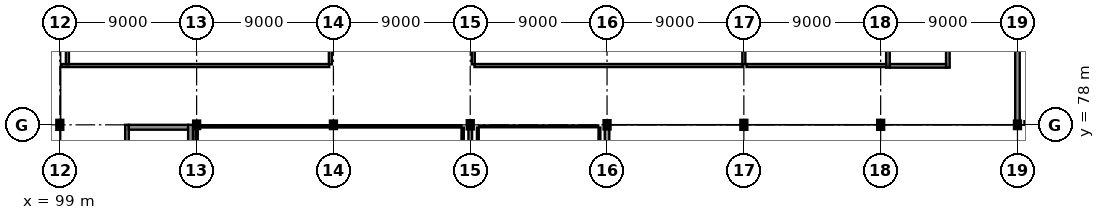
"""IFC4 building model, lengths in metres.
Left out: names, types, materials, properties, quantities, classifications, styles, units other than length and angle.
Written with IfcOpenShell. Run it as: python <this file> out.ifc"""

import sys

from ifc_helpers import new_model, si_unit, direction, frame, frame_2d, origin, origin_2d, place, context, subcontext, project, spatial, rectangle, i_section, extrude, element, fill, save


model = new_model("IFC4")
c1 = context("Model", 3, precision=1e-05, world=origin(), true_north=direction((0.0, 1.0)))
c2 = subcontext(c1, "Body", "Model", "MODEL_VIEW")
j1 = project(units=[si_unit("LENGTHUNIT", "METRE"), si_unit("PLANEANGLEUNIT", "RADIAN")], contexts=[c1])
p1 = place(None, origin())
s1 = spatial("IfcSite", under=j1, at=p1, CompositionType="ELEMENT")
p2 = place(p1, origin())
s2 = spatial("IfcBuilding", under=s1, at=p2, CompositionType="ELEMENT")
p3 = place(p2, frame((0.0, 0.0, 18.9)))
s3 = spatial("IfcBuildingStorey", under=s2, at=p3, CompositionType="ELEMENT", Elevation=18.9)
p4 = place(p3, frame((99.0, 78.0, 0.0), z_axis=(0.0, 0.0, 1.0), x_axis=(1.0, 0.0, 0.0)))
e1 = element("IfcColumn", 1, at=p4, inside=s3, PredefinedType="COLUMN", context=c2, shape_type="SweptSolid", body=[
    extrude(i_section(OverallWidth=0.3, OverallDepth=0.5, WebThickness=0.014, FlangeThickness=0.028, at=origin_2d()), origin(), (0.0, 0.0, 1.0), 4.3),
])
for number, where, z_axis, x_axis in (
    (2, (108.0, 78.0, 0.0), (0.0, 0.0, 1.0), (0.0, 1.0, 0.0)),
    (3, (117.0, 78.0, 0.0), (0.0, 0.0, 1.0), (1.0, 0.0, 0.0)),
):
    element("IfcColumn", number, at=place(p3, frame(where, z_axis=z_axis, x_axis=x_axis)), inside=s3, PredefinedType="COLUMN", context=c2, shape_type="SweptSolid", body=[
        extrude(i_section(OverallWidth=0.3, OverallDepth=0.4, WebThickness=0.013, FlangeThickness=0.024, at=origin_2d()), origin(), (0.0, 0.0, 1.0), 4.3),
    ])
for number, where, z_axis, x_axis in (
    (4, (126.0, 78.0, 0.0), (0.0, 0.0, 1.0), (1.0, 0.0, 0.0)),
    (5, (135.0, 78.0, 0.0), (0.0, 0.0, 1.0), (1.0, 0.0, 0.0)),
):
    element("IfcColumn", number, at=place(p3, frame(where, z_axis=z_axis, x_axis=x_axis)), inside=s3, PredefinedType="COLUMN", context=c2, shape_type="SweptSolid", body=[
        extrude(i_section(OverallWidth=0.3, OverallDepth=0.45, WebThickness=0.014, FlangeThickness=0.026, at=origin_2d()), origin(), (0.0, 0.0, 1.0), 4.3),
    ])
for number, where, z_axis, x_axis in (
    (6, (144.0, 78.0, 0.0), (0.0, 0.0, 1.0), (1.0, 0.0, 0.0)),
    (7, (153.0, 78.0, 0.0), (0.0, 0.0, 1.0), (0.0, 1.0, 0.0)),
):
    element("IfcColumn", number, at=place(p3, frame(where, z_axis=z_axis, x_axis=x_axis)), inside=s3, PredefinedType="COLUMN", context=c2, shape_type="SweptSolid", body=[
        extrude(i_section(OverallWidth=0.3, OverallDepth=0.5, WebThickness=0.014, FlangeThickness=0.028, at=origin_2d()), origin(), (0.0, 0.0, 1.0), 4.5),
    ])
p5 = place(p3, frame((162.0, 78.0, 0.0), z_axis=(0.0, 0.0, 1.0), x_axis=(1.0, 0.0, 0.0)))
e8 = element("IfcColumn", 8, at=p5, inside=s3, PredefinedType="COLUMN", context=c2, shape_type="SweptSolid", body=[
    extrude(i_section(OverallWidth=0.3, OverallDepth=0.4, WebThickness=0.013, FlangeThickness=0.024, at=origin_2d()), origin(), (0.0, 0.0, 1.0), 4.5),
])
p6 = place(p3, frame((135.0, 66.128, 0.0), z_axis=(0.0, 0.0, 1.0), x_axis=(0.0, 1.0, 0.0)))
e9 = element("IfcWall", 9, at=p6, inside=s3, PredefinedType="SOLIDWALL", context=c2, shape_type="SweptSolid", body=[
    extrude(rectangle(XDim=11.649, YDim=0.3, at=frame_2d((5.825, 0.0))), origin(), (0.0, 0.0, 1.0), 3.855),
])
p7 = place(p6, frame((2.262, 0.0, 0.85)))
e10 = element("IfcOpeningElement", 10, at=p7, cuts=e9, PredefinedType="OPENING", context=c2, shape_type="SweptSolid", body=[
    extrude(rectangle(XDim=2.0, YDim=2.0, at=frame_2d((1.0, 1.0))), frame((0.0, 0.165, 0.0), z_axis=(0.0, -1.0, 0.0), x_axis=(1.0, 0.0, 0.0)), (0.0, 0.0, 1.0), 0.33),
])
p8 = place(p6, frame((7.387, 0.0, 0.85)))
e11 = element("IfcOpeningElement", 11, at=p8, cuts=e9, PredefinedType="OPENING", context=c2, shape_type="SweptSolid", body=[
    extrude(rectangle(XDim=2.0, YDim=2.0, at=frame_2d((1.0, 1.0))), frame((0.0, 0.165, 0.0), z_axis=(0.0, -1.0, 0.0), x_axis=(1.0, 0.0, 0.0)), (0.0, 0.0, 1.0), 0.33),
])
p9 = place(p3, frame((162.0, 78.198, 0.0), z_axis=(0.0, 0.0, 1.0), x_axis=(0.0, 1.0, 0.0)))
e12 = element("IfcWall", 12, at=p9, inside=s3, PredefinedType="SOLIDWALL", context=c2, shape_type="SweptSolid", body=[
    extrude(rectangle(XDim=17.604, YDim=0.3, at=frame_2d((8.802, 0.0))), origin(), (0.0, 0.0, 1.0), 4.18),
])
p10 = place(p9, frame((8.302, 0.0, 0.0)))
e13 = element("IfcOpeningElement", 13, at=p10, cuts=e12, PredefinedType="OPENING", context=c2, shape_type="SweptSolid", body=[
    extrude(rectangle(XDim=1.0, YDim=2.2, at=frame_2d((0.5, 1.1))), frame((0.0, 0.165, 0.0), z_axis=(0.0, -1.0, 0.0), x_axis=(1.0, 0.0, 0.0)), (0.0, 0.0, 1.0), 0.33),
])
p11 = place(p3, frame((162.46, 78.12, 0.0), z_axis=(0.0, 0.0, 1.0), x_axis=(1.0, 0.0, 0.0)))
e14 = element("IfcWall", 14, at=p11, inside=s3, PredefinedType="PARAPET", context=c2, shape_type="SweptSolid", body=[
    extrude(rectangle(XDim=8.48, YDim=0.24, at=frame_2d((4.24, 0.0))), origin(), (0.0, 0.0, 1.0), 0.55),
])
p12 = place(p3, frame((153.48, 81.76, 0.0), z_axis=(0.0, 0.0, 1.0), x_axis=(0.0, 1.0, 0.0)))
e15 = element("IfcWall", 15, at=p12, inside=s3, PredefinedType="SHEAR", context=c2, shape_type="SweptSolid", body=[
    extrude(rectangle(XDim=8.28, YDim=0.24, at=frame_2d((4.14, 0.0))), origin(), (0.0, 0.0, 1.0), 4.31),
])
p13 = place(p3, frame((157.42, 81.76, 0.0), z_axis=(0.0, 0.0, 1.0), x_axis=(0.0, 1.0, 0.0)))
e16 = element("IfcWall", 16, at=p13, inside=s3, PredefinedType="SHEAR", context=c2, shape_type="SweptSolid", body=[
    extrude(rectangle(XDim=8.28, YDim=0.24, at=frame_2d((4.14, 0.0))), origin(), (0.0, 0.0, 1.0), 4.31),
])
p14 = place(p13, frame((0.49, 0.0, 0.0)))
e17 = element("IfcOpeningElement", 17, at=p14, cuts=e16, PredefinedType="OPENING", context=c2, shape_type="SweptSolid", body=[
    extrude(rectangle(XDim=1.3, YDim=2.2, at=frame_2d((0.65, 1.1))), frame((0.0, 0.135, 0.0), z_axis=(0.0, -1.0, 0.0), x_axis=(1.0, 0.0, 0.0)), (0.0, 0.0, 1.0), 0.27),
])
p15 = place(p3, frame((153.6, 81.88, 0.0), z_axis=(0.0, 0.0, 1.0), x_axis=(1.0, 0.0, 0.0)))
e18 = element("IfcWall", 18, at=p15, inside=s3, PredefinedType="SHEAR", context=c2, shape_type="SweptSolid", body=[
    extrude(rectangle(XDim=3.7, YDim=0.24, at=frame_2d((1.85, 0.0))), origin(), (0.0, 0.0, 1.0), 4.31),
])
p16 = place(p3, frame((103.42, 75.24, 0.0), z_axis=(0.0, 0.0, 1.0), x_axis=(0.0, 1.0, 0.0)))
e19 = element("IfcWall", 19, at=p16, inside=s3, PredefinedType="SHEAR", context=c2, shape_type="SweptSolid", body=[
    extrude(rectangle(XDim=2.76, YDim=0.24, at=frame_2d((1.38, 0.0))), origin(), (0.0, 0.0, 1.0), 4.16),
])
p17 = place(p3, frame((103.54, 77.84, 0.0), z_axis=(0.0, 0.0, 1.0), x_axis=(1.0, 0.0, 0.0)))
e20 = element("IfcWall", 20, at=p17, inside=s3, PredefinedType="SHEAR", context=c2, shape_type="SweptSolid", body=[
    extrude(rectangle(XDim=3.9, YDim=0.32, at=frame_2d((1.95, 0.0))), origin(), (0.0, 0.0, 1.0), 4.16),
])
p18 = place(p17, frame((1.225, 0.0, 0.0)))
e21 = element("IfcOpeningElement", 21, at=p18, cuts=e20, PredefinedType="OPENING", context=c2, shape_type="SweptSolid", body=[
    extrude(rectangle(XDim=1.45, YDim=2.2, at=frame_2d((0.725, 1.1))), frame((0.0, 0.175, 0.0), z_axis=(0.0, -1.0, 0.0), x_axis=(1.0, 0.0, 0.0)), (0.0, 0.0, 1.0), 0.35),
])
p19 = place(p3, frame((107.6, 68.96, 0.0), z_axis=(0.0, 0.0, 1.0), x_axis=(0.0, 1.0, 0.0)))
e22 = element("IfcWall", 22, at=p19, inside=s3, PredefinedType="SHEAR", context=c2, shape_type="SweptSolid", body=[
    extrude(rectangle(XDim=9.04, YDim=0.32, at=frame_2d((4.52, 0.0))), origin(), (0.0, 0.0, 1.0), 4.16),
])
p20 = place(p3, frame((126.0, 66.008, 0.0), z_axis=(0.0, 0.0, 1.0), x_axis=(0.0, 1.0, 0.0)))
e23 = element("IfcWall", 23, at=p20, inside=s3, PredefinedType="SHEAR", context=c2, shape_type="SweptSolid", body=[
    extrude(rectangle(XDim=11.769, YDim=0.24, at=frame_2d((5.885, 0.0))), origin(), (0.0, 0.0, 1.0), 3.905),
])
p21 = place(p3, frame((116.8, 95.802, 0.0), z_axis=(0.0, 0.0, 1.0), x_axis=(0.0, -1.0, 0.0)))
e24 = element("IfcWall", 24, at=p21, inside=s3, PredefinedType="PARTITIONING", context=c2, shape_type="SweptSolid", body=[
    extrude(rectangle(XDim=13.822, YDim=0.2, at=frame_2d((6.911, 0.0))), origin(), (0.0, 0.0, 1.0), 4.14),
])
p22 = place(p3, frame((116.72, 81.9, 0.0), z_axis=(0.0, 0.0, 1.0), x_axis=(-1.0, 0.0, 0.0)))
e25 = element("IfcWall", 25, at=p22, inside=s3, PredefinedType="PARTITIONING", context=c2, shape_type="SweptSolid", body=[
    extrude(rectangle(XDim=17.595, YDim=0.2, at=frame_2d((8.797, 0.0))), origin(), (0.0, 0.0, 1.0), 4.14),
])
p23 = place(p22, frame((7.947, 0.0, 0.0)))
e26 = element("IfcOpeningElement", 26, at=p23, cuts=e25, PredefinedType="OPENING", context=c2, shape_type="SweptSolid", body=[
    extrude(rectangle(XDim=1.7, YDim=2.4, at=frame_2d((0.85, 1.2))), frame((0.0, 0.115, 0.0), z_axis=(0.0, -1.0, 0.0), x_axis=(1.0, 0.0, 0.0)), (0.0, 0.0, 1.0), 0.23),
])
p24 = place(p3, frame((99.5, 81.98, 0.0), z_axis=(0.0, 0.0, 1.0), x_axis=(0.0, 1.0, 0.0)))
e27 = element("IfcWall", 27, at=p24, inside=s3, PredefinedType="PARTITIONING", context=c2, shape_type="SweptSolid", body=[
    extrude(rectangle(XDim=13.945, YDim=0.2, at=frame_2d((6.973, 0.0))), origin(), (0.0, 0.0, 1.0), 4.14),
])
p25 = place(p3, frame((143.92, 81.9, 0.0), z_axis=(0.0, 0.0, 1.0), x_axis=(-1.0, 0.0, 0.0)))
e28 = element("IfcWall", 28, at=p25, inside=s3, PredefinedType="PARTITIONING", context=c2, shape_type="SweptSolid", body=[
    extrude(rectangle(XDim=17.64, YDim=0.2, at=frame_2d((8.82, 0.0))), origin(), (0.0, 0.0, 1.0), 4.14),
])
p26 = place(p25, frame((7.82, 0.0, 0.0)))
e29 = element("IfcOpeningElement", 29, at=p26, cuts=e28, PredefinedType="OPENING", context=c2, shape_type="SweptSolid", body=[
    extrude(rectangle(XDim=2.0, YDim=2.6, at=frame_2d((1.0, 1.3))), frame((0.0, 0.115, 0.0), z_axis=(0.0, -1.0, 0.0), x_axis=(1.0, 0.0, 0.0)), (0.0, 0.0, 1.0), 0.23),
])
for number, where, z_axis, x_axis in (
    (30, (126.2, 81.98, 0.0), (0.0, 0.0, 1.0), (0.0, 1.0, 0.0)),
    (31, (144.0, 95.42, 0.0), (0.0, 0.0, 1.0), (0.0, -1.0, 0.0)),
):
    element("IfcWall", number, at=place(p3, frame(where, z_axis=z_axis, x_axis=x_axis)), inside=s3, PredefinedType="PARTITIONING", context=c2, shape_type="SweptSolid", body=[
        extrude(rectangle(XDim=13.44, YDim=0.2, at=frame_2d((6.72, 0.0))), origin(), (0.0, 0.0, 1.0), 4.14),
    ])
p27 = place(p3, frame((153.365, 81.9, 0.0), z_axis=(0.0, 0.0, 1.0), x_axis=(-1.0, 0.0, 0.0)))
e32 = element("IfcWall", 32, at=p27, inside=s3, PredefinedType="PARTITIONING", context=c2, shape_type="SweptSolid", body=[
    extrude(rectangle(XDim=9.185, YDim=0.2, at=frame_2d((4.593, 0.0))), origin(), (0.0, 0.0, 1.0), 4.14),
])
p28 = place(p27, frame((3.643, 0.0, 0.0)))
e33 = element("IfcOpeningElement", 33, at=p28, cuts=e32, PredefinedType="OPENING", context=c2, shape_type="SweptSolid", body=[
    extrude(rectangle(XDim=1.9, YDim=2.5, at=frame_2d((0.95, 1.25))), frame((0.0, 0.115, 0.0), z_axis=(0.0, -1.0, 0.0), x_axis=(1.0, 0.0, 0.0)), (0.0, 0.0, 1.0), 0.23),
])
p29 = place(p3, frame((125.5, 77.82, 0.0), z_axis=(0.0, 0.0, 1.0), x_axis=(0.0, -1.0, 0.0)))
e34 = element("IfcWall", 34, at=p29, inside=s3, PredefinedType="PARTITIONING", context=c2, shape_type="SweptSolid", body=[
    extrude(rectangle(XDim=11.745, YDim=0.15, at=frame_2d((5.873, 0.0))), origin(), (0.0, 0.0, 1.0), 4.14),
])
p30 = place(p3, frame((108.0, 66.48, 0.0), z_axis=(0.0, 0.0, 1.0), x_axis=(0.0, 1.0, 0.0)))
e35 = element("IfcWall", 35, at=p30, inside=s3, PredefinedType="PARTITIONING", context=c2, shape_type="SweptSolid", body=[
    extrude(rectangle(XDim=11.34, YDim=0.15, at=frame_2d((5.67, 0.0))), origin(), (0.0, 0.0, 1.0), 3.695),
])
p31 = place(p3, frame((107.798, 77.9, 0.0), z_axis=(0.0, 0.0, 1.0), x_axis=(1.0, 0.0, 0.0)))
e36 = element("IfcWall", 36, at=p31, inside=s3, PredefinedType="PARTITIONING", context=c2, shape_type="SweptSolid", body=[
    extrude(rectangle(XDim=17.622, YDim=0.15, at=frame_2d((8.811, 0.0))), origin(), (0.0, 0.0, 1.0), 3.705),
])
p32 = place(p31, frame((7.581, 0.0, 0.0)))
e37 = element("IfcOpeningElement", 37, at=p32, cuts=e36, PredefinedType="OPENING", context=c2, shape_type="SweptSolid", body=[
    extrude(rectangle(XDim=1.05, YDim=2.25, at=frame_2d((0.525, 1.125))), frame((0.0, 0.09, 0.0), z_axis=(0.0, -1.0, 0.0), x_axis=(1.0, 0.0, 0.0)), (0.0, 0.0, 1.0), 0.18),
])
p33 = place(p3, frame((126.5, 66.075, 0.0), z_axis=(0.0, 0.0, 1.0), x_axis=(0.0, 1.0, 0.0)))
e38 = element("IfcWall", 38, at=p33, inside=s3, PredefinedType="PARTITIONING", context=c2, shape_type="SweptSolid", body=[
    extrude(rectangle(XDim=11.745, YDim=0.12, at=frame_2d((5.873, 0.0))), origin(), (0.0, 0.0, 1.0), 4.14),
])
p34 = place(p3, frame((126.58, 77.9, 0.0), z_axis=(0.0, 0.0, 1.0), x_axis=(1.0, 0.0, 0.0)))
e39 = element("IfcWall", 39, at=p34, inside=s3, PredefinedType="PARTITIONING", context=c2, shape_type="SweptSolid", body=[
    extrude(rectangle(XDim=7.84, YDim=0.12, at=frame_2d((3.92, 0.0))), origin(), (0.0, 0.0, 1.0), 3.705),
])
p35 = place(p34, frame((3.47, 0.0, 0.0)))
e40 = element("IfcOpeningElement", 40, at=p35, cuts=e39, PredefinedType="OPENING", context=c2, shape_type="SweptSolid", body=[
    extrude(rectangle(XDim=0.9, YDim=2.1, at=frame_2d((0.45, 1.05))), frame((0.0, 0.075, 0.0), z_axis=(0.0, -1.0, 0.0), x_axis=(1.0, 0.0, 0.0)), (0.0, 0.0, 1.0), 0.15),
])
p36 = place(p3, frame((134.5, 77.82, 0.0), z_axis=(0.0, 0.0, 1.0), x_axis=(0.0, -1.0, 0.0)))
e41 = element("IfcWall", 41, at=p36, inside=s3, PredefinedType="PARTITIONING", context=c2, shape_type="SweptSolid", body=[
    extrude(rectangle(XDim=11.745, YDim=0.12, at=frame_2d((5.873, 0.0))), origin(), (0.0, 0.0, 1.0), 4.14),
])
p37 = place(p14, frame((1.3, 0.0, 0.0), z_axis=(0.0, 0.0, 1.0), x_axis=(-1.0, 0.0, 0.0)))
e42 = element("IfcDoor", 42, at=p37, inside=s3, OperationType="SINGLE_SWING_LEFT", PredefinedType="DOOR", context=c2, shape_type="SweptSolid", body=[
    extrude(rectangle(XDim=1.3, YDim=2.2, at=frame_2d((0.65, 1.1))), frame((0.0, 0.025, 0.0), z_axis=(0.0, -1.0, 0.0), x_axis=(1.0, 0.0, 0.0)), (0.0, 0.0, 1.0), 0.05),
])
fill(e17, e42)
p38 = place(p18, origin())
e43 = element("IfcDoor", 43, at=p38, inside=s3, OperationType="DOUBLE_DOOR_SINGLE_SWING", PredefinedType="DOOR", context=c2, shape_type="SweptSolid", body=[
    extrude(rectangle(XDim=1.45, YDim=2.2, at=frame_2d((0.725, 1.1))), frame((0.0, 0.025, 0.0), z_axis=(0.0, -1.0, 0.0), x_axis=(1.0, 0.0, 0.0)), (0.0, 0.0, 1.0), 0.05),
])
fill(e21, e43)
p39 = place(p23, origin())
e44 = element("IfcDoor", 44, at=p39, inside=s3, OperationType="DOUBLE_DOOR_SINGLE_SWING", PredefinedType="DOOR", context=c2, shape_type="SweptSolid", body=[
    extrude(rectangle(XDim=1.7, YDim=2.4, at=frame_2d((0.85, 1.2))), frame((0.0, 0.025, 0.0), z_axis=(0.0, -1.0, 0.0), x_axis=(1.0, 0.0, 0.0)), (0.0, 0.0, 1.0), 0.05),
])
fill(e26, e44)
p40 = place(p26, frame((2.0, 0.0, 0.0), z_axis=(0.0, 0.0, 1.0), x_axis=(-1.0, 0.0, 0.0)))
e45 = element("IfcDoor", 45, at=p40, inside=s3, OperationType="DOUBLE_DOOR_SINGLE_SWING", PredefinedType="DOOR", context=c2, shape_type="SweptSolid", body=[
    extrude(rectangle(XDim=2.0, YDim=2.6, at=frame_2d((1.0, 1.3))), frame((0.0, 0.025, 0.0), z_axis=(0.0, -1.0, 0.0), x_axis=(1.0, 0.0, 0.0)), (0.0, 0.0, 1.0), 0.05),
])
fill(e29, e45)
p41 = place(p28, origin())
e46 = element("IfcDoor", 46, at=p41, inside=s3, OperationType="DOUBLE_DOOR_SINGLE_SWING", PredefinedType="DOOR", context=c2, shape_type="SweptSolid", body=[
    extrude(rectangle(XDim=1.9, YDim=2.5, at=frame_2d((0.95, 1.25))), frame((0.0, 0.025, 0.0), z_axis=(0.0, -1.0, 0.0), x_axis=(1.0, 0.0, 0.0)), (0.0, 0.0, 1.0), 0.05),
])
fill(e33, e46)
p42 = place(p32, frame((1.05, 0.0, 0.0), z_axis=(0.0, 0.0, 1.0), x_axis=(-1.0, 0.0, 0.0)))
e47 = element("IfcDoor", 47, at=p42, inside=s3, OperationType="SINGLE_SWING_RIGHT", PredefinedType="DOOR", context=c2, shape_type="SweptSolid", body=[
    extrude(rectangle(XDim=1.05, YDim=2.25, at=frame_2d((0.525, 1.125))), frame((0.0, 0.025, 0.0), z_axis=(0.0, -1.0, 0.0), x_axis=(1.0, 0.0, 0.0)), (0.0, 0.0, 1.0), 0.05),
])
fill(e37, e47)
p43 = place(p35, origin())
e48 = element("IfcDoor", 48, at=p43, inside=s3, OperationType="SINGLE_SWING_LEFT", PredefinedType="DOOR", context=c2, shape_type="SweptSolid", body=[
    extrude(rectangle(XDim=0.9, YDim=2.1, at=frame_2d((0.45, 1.05))), frame((0.0, 0.025, 0.0), z_axis=(0.0, -1.0, 0.0), x_axis=(1.0, 0.0, 0.0)), (0.0, 0.0, 1.0), 0.05),
])
fill(e40, e48)
save(model, sys.argv[1])
